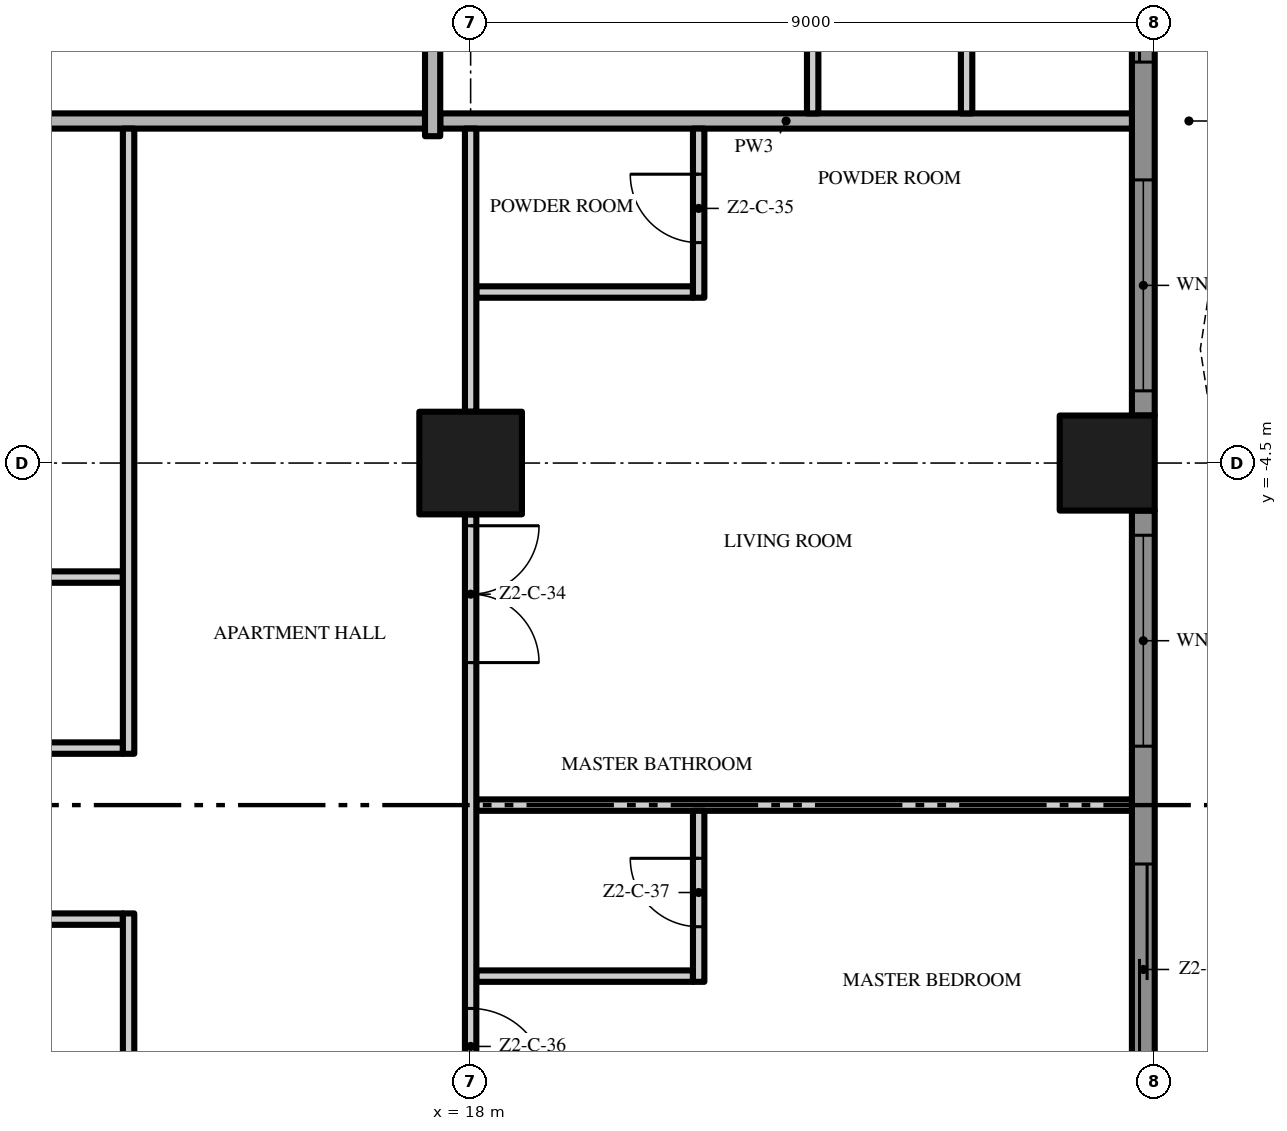
"""IFC4 building model, lengths in metres.
Left out: names, types, materials, properties, quantities, classifications, styles, units other than length and angle.
Written with IfcOpenShell. Run it as: python <this file> out.ifc"""

import sys

from ifc_helpers import new_model, si_unit, direction, frame, frame_2d, origin, origin_2d, place, context, subcontext, project, spatial, polyline, rectangle, outline, extrude, element, fill, save


model = new_model("IFC4")
c1 = context("Model", 3, precision=1e-05, world=origin(), true_north=direction((0.0, 1.0)))
c2 = subcontext(c1, "Body", "Model", "MODEL_VIEW")
j1 = project(units=[si_unit("LENGTHUNIT", "METRE"), si_unit("PLANEANGLEUNIT", "RADIAN")], contexts=[c1])
p1 = place(None, origin())
s1 = spatial("IfcSite", under=j1, at=p1, CompositionType="ELEMENT")
p2 = place(p1, origin())
s2 = spatial("IfcBuilding", under=s1, at=p2, CompositionType="ELEMENT")
p3 = place(p2, frame((0.0, 0.0, 99.8)))
s3 = spatial("IfcBuildingStorey", under=s2, at=p3, CompositionType="ELEMENT", Elevation=99.8)
p4 = place(p3, frame((18.0, -4.5, 0.0), z_axis=(0.0, 0.0, 1.0), x_axis=(1.0, 0.0, 0.0)))
e1 = element("IfcColumn", 1, at=p4, inside=s3, PredefinedType="COLUMN", context=c2, shape_type="SweptSolid", body=[
    extrude(rectangle(XDim=1.35, YDim=1.35, at=origin_2d()), origin(), (0.0, 0.0, 1.0), 3.5),
])
p5 = place(p3, frame((26.375, -4.5, 0.0), z_axis=(0.0, 0.0, 1.0), x_axis=(1.0, 0.0, 0.0)))
e2 = element("IfcColumn", 2, at=p5, inside=s3, PredefinedType="COLUMN", context=c2, shape_type="SweptSolid", body=[
    extrude(rectangle(XDim=1.25, YDim=1.25, at=origin_2d()), origin(), (0.0, 0.0, 1.0), 3.5),
])
p6 = place(p3, frame((26.85, -5.125, 0.0), z_axis=(0.0, 0.0, 1.0), x_axis=(0.0, -1.0, 0.0)))
e3 = element("IfcWall", 3, at=p6, inside=s3, PredefinedType="SOLIDWALL", context=c2, shape_type="SweptSolid", body=[
    extrude(rectangle(XDim=7.75, YDim=0.3, at=frame_2d((3.875, 0.0))), origin(), (0.0, 0.0, 1.0), 3.5),
])
p7 = place(p6, frame((4.65, 0.0, 0.0)))
e4 = element("IfcOpeningElement", 4, at=p7, cuts=e3, PredefinedType="OPENING", context=c2, shape_type="SweptSolid", body=[
    extrude(rectangle(XDim=2.775, YDim=2.4, at=frame_2d((1.387, 1.2))), frame((0.0, 0.16, 0.0), z_axis=(0.0, -1.0, 0.0), x_axis=(1.0, 0.0, 0.0)), (0.0, 0.0, 1.0), 0.32),
])
p8 = place(p6, frame((0.325, 0.0, 0.45)))
e5 = element("IfcOpeningElement", 5, at=p8, cuts=e3, PredefinedType="OPENING", context=c2, shape_type="SweptSolid", body=[
    extrude(rectangle(XDim=2.775, YDim=2.65, at=frame_2d((1.387, 1.325))), frame((0.0, 0.16, 0.0), z_axis=(0.0, -1.0, 0.0), x_axis=(1.0, 0.0, 0.0)), (0.0, 0.0, 1.0), 0.32),
])
p9 = place(p3, frame((26.85, 3.875, 0.0), z_axis=(0.0, 0.0, 1.0), x_axis=(0.0, -1.0, 0.0)))
e6 = element("IfcWall", 6, at=p9, inside=s3, PredefinedType="SOLIDWALL", context=c2, shape_type="SweptSolid", body=[
    extrude(rectangle(XDim=7.75, YDim=0.3, at=frame_2d((3.875, 0.0))), origin(), (0.0, 0.0, 1.0), 3.5),
])
p10 = place(p9, frame((4.65, 0.0, 0.45)))
e7 = element("IfcOpeningElement", 7, at=p10, cuts=e6, PredefinedType="OPENING", context=c2, shape_type="SweptSolid", body=[
    extrude(rectangle(XDim=2.775, YDim=2.65, at=frame_2d((1.387, 1.325))), frame((0.0, 0.16, 0.0), z_axis=(0.0, -1.0, 0.0), x_axis=(1.0, 0.0, 0.0)), (0.0, 0.0, 1.0), 0.32),
])
p11 = place(p9, frame((0.325, 0.0, 0.0)))
e8 = element("IfcOpeningElement", 8, at=p11, cuts=e6, PredefinedType="OPENING", context=c2, shape_type="SweptSolid", body=[
    extrude(rectangle(XDim=2.775, YDim=2.4, at=frame_2d((1.387, 1.2))), frame((0.0, 0.16, 0.0), z_axis=(0.0, -1.0, 0.0), x_axis=(1.0, 0.0, 0.0)), (0.0, 0.0, 1.0), 0.32),
])
p12 = place(p3, origin())
e9 = element("IfcWall", 9, at=p12, inside=s3, PredefinedType="USERDEFINED", context=c2, shape_type="SweptSolid", body=[
    extrude(outline(polyline([(27.6, -18.0), (27.829, -16.5), (28.429, -15.0), (29.171, -13.5), (29.771, -12.0), (30.0, -10.5), (29.771, -9.0), (29.171, -7.5), (28.429, -6.0), (27.829, -4.5), (27.6, -3.0), (27.829, -1.5), (28.429, 0.0), (29.171, 1.5), (29.771, 3.0), (30.0, 4.5), (29.771, 6.0), (29.171, 7.5), (28.429, 9.0), (27.829, 10.5), (27.6, 12.0), (27.829, 13.5), (28.429, 15.0), (29.171, 16.5), (29.771, 18.0), (29.539, 18.093), (28.942, 16.602), (28.201, 15.102), (27.586, 13.566), (27.347, 12.0), (27.586, 10.434), (28.201, 8.898), (28.942, 7.398), (29.528, 5.934), (29.747, 4.5), (29.528, 3.066), (28.942, 1.602), (28.201, 0.102), (27.586, -1.434), (27.347, -3.0), (27.586, -4.566), (28.201, -6.102), (28.942, -7.602), (29.528, -9.066), (29.747, -10.5), (29.528, -11.934), (28.942, -13.398), (28.201, -14.898), (27.586, -16.434), (27.353, -17.962), (27.6, -18.0)])), origin(), (0.0, 0.0, 1.0), 0.9),
])
p13 = place(p3, frame((18.075, -11.25, 0.0), z_axis=(0.0, 0.0, 1.0), x_axis=(1.0, 0.0, 0.0)))
e10 = element("IfcWall", 10, at=p13, inside=s3, PredefinedType="PARTITIONING", context=c2, shape_type="SweptSolid", body=[
    extrude(rectangle(XDim=2.85, YDim=0.15, at=frame_2d((1.425, 0.0))), origin(), (0.0, 0.0, 1.0), 3.5),
])
p14 = place(p3, frame((9.075, -10.5, 0.0), z_axis=(0.0, 0.0, 1.0), x_axis=(1.0, 0.0, 0.0)))
e11 = element("IfcWall", 11, at=p14, inside=s3, PredefinedType="PARTITIONING", context=c2, shape_type="SweptSolid", body=[
    extrude(rectangle(XDim=4.35, YDim=0.15, at=frame_2d((2.175, 0.0))), origin(), (0.0, 0.0, 1.0), 3.5),
])
p15 = place(p3, frame((18.075, -9.0, 0.0), z_axis=(0.0, 0.0, 1.0), x_axis=(1.0, 0.0, 0.0)))
e12 = element("IfcWall", 12, at=p15, inside=s3, PredefinedType="PARTITIONING", context=c2, shape_type="SweptSolid", body=[
    extrude(rectangle(XDim=8.625, YDim=0.15, at=frame_2d((4.312, 0.0))), origin(), (0.0, 0.0, 1.0), 3.5),
])
p16 = place(p3, frame((9.075, -8.25, 0.0), z_axis=(0.0, 0.0, 1.0), x_axis=(1.0, 0.0, 0.0)))
e13 = element("IfcWall", 13, at=p16, inside=s3, PredefinedType="PARTITIONING", context=c2, shape_type="SweptSolid", body=[
    extrude(rectangle(XDim=4.35, YDim=0.15, at=frame_2d((2.175, 0.0))), origin(), (0.0, 0.0, 1.0), 3.5),
])
p17 = place(p16, frame((1.75, 0.0, 0.0)))
e14 = element("IfcOpeningElement", 14, at=p17, cuts=e13, PredefinedType="OPENING", context=c2, shape_type="SweptSolid", body=[
    extrude(rectangle(XDim=0.9, YDim=2.1, at=frame_2d((0.45, 1.05))), frame((0.0, 0.085, 0.0), z_axis=(0.0, -1.0, 0.0), x_axis=(1.0, 0.0, 0.0)), (0.0, 0.0, 1.0), 0.17),
])
p18 = place(p3, frame((9.075, -6.0, 0.0), z_axis=(0.0, 0.0, 1.0), x_axis=(1.0, 0.0, 0.0)))
e15 = element("IfcWall", 15, at=p18, inside=s3, PredefinedType="PARTITIONING", context=c2, shape_type="SweptSolid", body=[
    extrude(rectangle(XDim=4.35, YDim=0.15, at=frame_2d((2.175, 0.0))), origin(), (0.0, 0.0, 1.0), 3.5),
])
p19 = place(p3, frame((18.075, -2.25, 0.0), z_axis=(0.0, 0.0, 1.0), x_axis=(1.0, 0.0, 0.0)))
e16 = element("IfcWall", 16, at=p19, inside=s3, PredefinedType="PARTITIONING", context=c2, shape_type="SweptSolid", body=[
    extrude(rectangle(XDim=2.85, YDim=0.15, at=frame_2d((1.425, 0.0))), origin(), (0.0, 0.0, 1.0), 3.5),
])
p20 = place(p3, frame((4.6, 0.0, 0.0), z_axis=(0.0, 0.0, 1.0), x_axis=(1.0, 0.0, 0.0)))
e17 = element("IfcWall", 17, at=p20, inside=s3, PredefinedType="PARTITIONING", context=c2, shape_type="SweptSolid", body=[
    extrude(rectangle(XDim=12.8, YDim=0.2, at=frame_2d((6.4, 0.0))), origin(), (0.0, 0.0, 1.0), 3.5),
])
p21 = place(p3, frame((17.6, 0.0, 0.0), z_axis=(0.0, 0.0, 1.0), x_axis=(1.0, 0.0, 0.0)))
e18 = element("IfcWall", 18, at=p21, inside=s3, PredefinedType="PARTITIONING", context=c2, shape_type="SweptSolid", body=[
    extrude(rectangle(XDim=9.1, YDim=0.2, at=frame_2d((4.55, 0.0))), origin(), (0.0, 0.0, 1.0), 3.5),
])
p22 = place(p3, frame((13.5, -22.2, 0.0), z_axis=(0.0, 0.0, 1.0), x_axis=(0.0, 1.0, 0.0)))
e19 = element("IfcWall", 19, at=p22, inside=s3, PredefinedType="PARTITIONING", context=c2, shape_type="SweptSolid", body=[
    extrude(rectangle(XDim=11.775, YDim=0.15, at=frame_2d((5.888, 0.0))), origin(), (0.0, 0.0, 1.0), 3.5),
])
p23 = place(p22, frame((8.25, 0.0, 0.0)))
e20 = element("IfcOpeningElement", 20, at=p23, cuts=e19, PredefinedType="OPENING", context=c2, shape_type="SweptSolid", body=[
    extrude(rectangle(XDim=0.9, YDim=2.1, at=frame_2d((0.45, 1.05))), frame((0.0, 0.085, 0.0), z_axis=(0.0, -1.0, 0.0), x_axis=(1.0, 0.0, 0.0)), (0.0, 0.0, 1.0), 0.17),
])
p24 = place(p3, frame((13.5, -8.325, 0.0), z_axis=(0.0, 0.0, 1.0), x_axis=(0.0, 1.0, 0.0)))
e21 = element("IfcWall", 21, at=p24, inside=s3, PredefinedType="PARTITIONING", context=c2, shape_type="SweptSolid", body=[
    extrude(rectangle(XDim=8.225, YDim=0.15, at=frame_2d((4.112, 0.0))), origin(), (0.0, 0.0, 1.0), 3.5),
])
p25 = place(p3, frame((17.5, -0.2, 0.0), z_axis=(0.0, 0.0, 1.0), x_axis=(0.0, 1.0, 0.0)))
e22 = element("IfcWall", 22, at=p25, inside=s3, PredefinedType="PARTITIONING", context=c2, shape_type="SweptSolid", body=[
    extrude(rectangle(XDim=4.025, YDim=0.2, at=frame_2d((2.013, 0.0))), origin(), (0.0, 0.0, 1.0), 3.5),
])
p26 = place(p3, frame((18.0, -5.175, 0.0), z_axis=(0.0, 0.0, 1.0), x_axis=(0.0, -1.0, 0.0)))
e23 = element("IfcWall", 23, at=p26, inside=s3, PredefinedType="PARTITIONING", context=c2, shape_type="SweptSolid", body=[
    extrude(rectangle(XDim=7.65, YDim=0.15, at=frame_2d((3.825, 0.0))), origin(), (0.0, 0.0, 1.0), 3.5),
])
p27 = place(p26, frame((0.15, 0.0, 0.0)))
e24 = element("IfcOpeningElement", 24, at=p27, cuts=e23, PredefinedType="OPENING", context=c2, shape_type="SweptSolid", body=[
    extrude(rectangle(XDim=1.8, YDim=2.4, at=frame_2d((0.9, 1.2))), frame((0.0, 0.085, 0.0), z_axis=(0.0, -1.0, 0.0), x_axis=(1.0, 0.0, 0.0)), (0.0, 0.0, 1.0), 0.17),
])
p28 = place(p26, frame((6.5, 0.0, 0.0)))
e25 = element("IfcOpeningElement", 25, at=p28, cuts=e23, PredefinedType="OPENING", context=c2, shape_type="SweptSolid", body=[
    extrude(rectangle(XDim=1.0, YDim=2.4, at=frame_2d((0.5, 1.2))), frame((0.0, 0.085, 0.0), z_axis=(0.0, -1.0, 0.0), x_axis=(1.0, 0.0, 0.0)), (0.0, 0.0, 1.0), 0.17),
])
p29 = place(p3, frame((18.0, -3.825, 0.0), z_axis=(0.0, 0.0, 1.0), x_axis=(0.0, 1.0, 0.0)))
e26 = element("IfcWall", 26, at=p29, inside=s3, PredefinedType="PARTITIONING", context=c2, shape_type="SweptSolid", body=[
    extrude(rectangle(XDim=3.725, YDim=0.15, at=frame_2d((1.863, 0.0))), origin(), (0.0, 0.0, 1.0), 3.5),
])
p30 = place(p3, frame((21.0, -11.325, 0.0), z_axis=(0.0, 0.0, 1.0), x_axis=(0.0, 1.0, 0.0)))
e27 = element("IfcWall", 27, at=p30, inside=s3, PredefinedType="PARTITIONING", context=c2, shape_type="SweptSolid", body=[
    extrude(rectangle(XDim=2.25, YDim=0.15, at=frame_2d((1.125, 0.0))), origin(), (0.0, 0.0, 1.0), 3.5),
])
p31 = place(p30, frame((0.725, 0.0, 0.0)))
e28 = element("IfcOpeningElement", 28, at=p31, cuts=e27, PredefinedType="OPENING", context=c2, shape_type="SweptSolid", body=[
    extrude(rectangle(XDim=0.9, YDim=2.1, at=frame_2d((0.45, 1.05))), frame((0.0, 0.085, 0.0), z_axis=(0.0, -1.0, 0.0), x_axis=(1.0, 0.0, 0.0)), (0.0, 0.0, 1.0), 0.17),
])
p32 = place(p3, frame((21.0, -2.325, 0.0), z_axis=(0.0, 0.0, 1.0), x_axis=(0.0, 1.0, 0.0)))
e29 = element("IfcWall", 29, at=p32, inside=s3, PredefinedType="PARTITIONING", context=c2, shape_type="SweptSolid", body=[
    extrude(rectangle(XDim=2.225, YDim=0.15, at=frame_2d((1.113, 0.0))), origin(), (0.0, 0.0, 1.0), 3.5),
])
p33 = place(p32, frame((0.725, 0.0, 0.0)))
e30 = element("IfcOpeningElement", 30, at=p33, cuts=e29, PredefinedType="OPENING", context=c2, shape_type="SweptSolid", body=[
    extrude(rectangle(XDim=0.9, YDim=2.1, at=frame_2d((0.45, 1.05))), frame((0.0, 0.085, 0.0), z_axis=(0.0, -1.0, 0.0), x_axis=(1.0, 0.0, 0.0)), (0.0, 0.0, 1.0), 0.17),
])
p34 = place(p3, frame((22.5, 17.375, 0.0), z_axis=(0.0, 0.0, 1.0), x_axis=(0.0, -1.0, 0.0)))
e31 = element("IfcWall", 31, at=p34, inside=s3, PredefinedType="PARTITIONING", context=c2, shape_type="SweptSolid", body=[
    extrude(rectangle(XDim=17.275, YDim=0.15, at=frame_2d((8.637, 0.0))), origin(), (0.0, 0.0, 1.0), 3.5),
])
p35 = place(p34, frame((13.075, 0.0, 0.0)))
e32 = element("IfcOpeningElement", 32, at=p35, cuts=e31, PredefinedType="OPENING", context=c2, shape_type="SweptSolid", body=[
    extrude(rectangle(XDim=1.8, YDim=2.4, at=frame_2d((0.9, 1.2))), frame((0.0, 0.085, 0.0), z_axis=(0.0, -1.0, 0.0), x_axis=(1.0, 0.0, 0.0)), (0.0, 0.0, 1.0), 0.17),
])
p36 = place(p34, frame((5.625, 0.0, 0.0)))
e33 = element("IfcOpeningElement", 33, at=p36, cuts=e31, PredefinedType="OPENING", context=c2, shape_type="SweptSolid", body=[
    extrude(rectangle(XDim=1.0, YDim=2.4, at=frame_2d((0.5, 1.2))), frame((0.0, 0.085, 0.0), z_axis=(0.0, -1.0, 0.0), x_axis=(1.0, 0.0, 0.0)), (0.0, 0.0, 1.0), 0.17),
])
p37 = place(p3, frame((24.525, 0.1, 0.0), z_axis=(0.0, 0.0, 1.0), x_axis=(0.0, 1.0, 0.0)))
e34 = element("IfcWall", 34, at=p37, inside=s3, PredefinedType="PARTITIONING", context=c2, shape_type="SweptSolid", body=[
    extrude(rectangle(XDim=2.225, YDim=0.15, at=frame_2d((1.113, 0.0))), origin(), (0.0, 0.0, 1.0), 3.5),
])
p38 = place(p7, origin())
e35 = element("IfcDoor", 35, at=p38, inside=s3, OperationType="SINGLE_SWING_LEFT", PredefinedType="DOOR", context=c2, shape_type="SweptSolid", body=[
    extrude(rectangle(XDim=2.775, YDim=2.4, at=frame_2d((1.387, 1.2))), frame((0.0, 0.025, 0.0), z_axis=(0.0, -1.0, 0.0), x_axis=(1.0, 0.0, 0.0)), (0.0, 0.0, 1.0), 0.05),
])
fill(e4, e35)
p39 = place(p8, origin())
e36 = element("IfcWindow", 36, at=p39, inside=s3, PartitioningType="SINGLE_PANEL", PredefinedType="WINDOW", context=c2, shape_type="SweptSolid", body=[
    extrude(rectangle(XDim=2.775, YDim=2.65, at=frame_2d((1.387, 1.325))), frame((0.0, 0.03, 0.0), z_axis=(0.0, -1.0, 0.0), x_axis=(1.0, 0.0, 0.0)), (0.0, 0.0, 1.0), 0.06),
])
fill(e5, e36)
p40 = place(p10, origin())
e37 = element("IfcWindow", 37, at=p40, inside=s3, PartitioningType="SINGLE_PANEL", PredefinedType="WINDOW", context=c2, shape_type="SweptSolid", body=[
    extrude(rectangle(XDim=2.775, YDim=2.65, at=frame_2d((1.387, 1.325))), frame((0.0, 0.03, 0.0), z_axis=(0.0, -1.0, 0.0), x_axis=(1.0, 0.0, 0.0)), (0.0, 0.0, 1.0), 0.06),
])
fill(e7, e37)
p41 = place(p11, origin())
e38 = element("IfcDoor", 38, at=p41, inside=s3, OperationType="SINGLE_SWING_LEFT", PredefinedType="DOOR", context=c2, shape_type="SweptSolid", body=[
    extrude(rectangle(XDim=2.775, YDim=2.4, at=frame_2d((1.387, 1.2))), frame((0.0, 0.025, 0.0), z_axis=(0.0, -1.0, 0.0), x_axis=(1.0, 0.0, 0.0)), (0.0, 0.0, 1.0), 0.05),
])
fill(e8, e38)
p42 = place(p27, origin())
e39 = element("IfcDoor", 39, at=p42, inside=s3, OperationType="DOUBLE_DOOR_SINGLE_SWING", PredefinedType="DOOR", context=c2, shape_type="SweptSolid", body=[
    extrude(rectangle(XDim=1.8, YDim=2.4, at=frame_2d((0.9, 1.2))), frame((0.0, 0.025, 0.0), z_axis=(0.0, -1.0, 0.0), x_axis=(1.0, 0.0, 0.0)), (0.0, 0.0, 1.0), 0.05),
])
fill(e24, e39)
p43 = place(p33, origin())
e40 = element("IfcDoor", 40, at=p43, inside=s3, OperationType="SINGLE_SWING_RIGHT", PredefinedType="DOOR", context=c2, shape_type="SweptSolid", body=[
    extrude(rectangle(XDim=0.9, YDim=2.1, at=frame_2d((0.45, 1.05))), frame((0.0, 0.025, 0.0), z_axis=(0.0, -1.0, 0.0), x_axis=(1.0, 0.0, 0.0)), (0.0, 0.0, 1.0), 0.05),
])
fill(e30, e40)
p44 = place(p28, origin())
e41 = element("IfcDoor", 41, at=p44, inside=s3, OperationType="SINGLE_SWING_RIGHT", PredefinedType="DOOR", context=c2, shape_type="SweptSolid", body=[
    extrude(rectangle(XDim=1.0, YDim=2.4, at=frame_2d((0.5, 1.2))), frame((0.0, 0.025, 0.0), z_axis=(0.0, -1.0, 0.0), x_axis=(1.0, 0.0, 0.0)), (0.0, 0.0, 1.0), 0.05),
])
fill(e25, e41)
p45 = place(p31, origin())
e42 = element("IfcDoor", 42, at=p45, inside=s3, OperationType="SINGLE_SWING_RIGHT", PredefinedType="DOOR", context=c2, shape_type="SweptSolid", body=[
    extrude(rectangle(XDim=0.9, YDim=2.1, at=frame_2d((0.45, 1.05))), frame((0.0, 0.025, 0.0), z_axis=(0.0, -1.0, 0.0), x_axis=(1.0, 0.0, 0.0)), (0.0, 0.0, 1.0), 0.05),
])
fill(e28, e42)
save(model, sys.argv[1])
